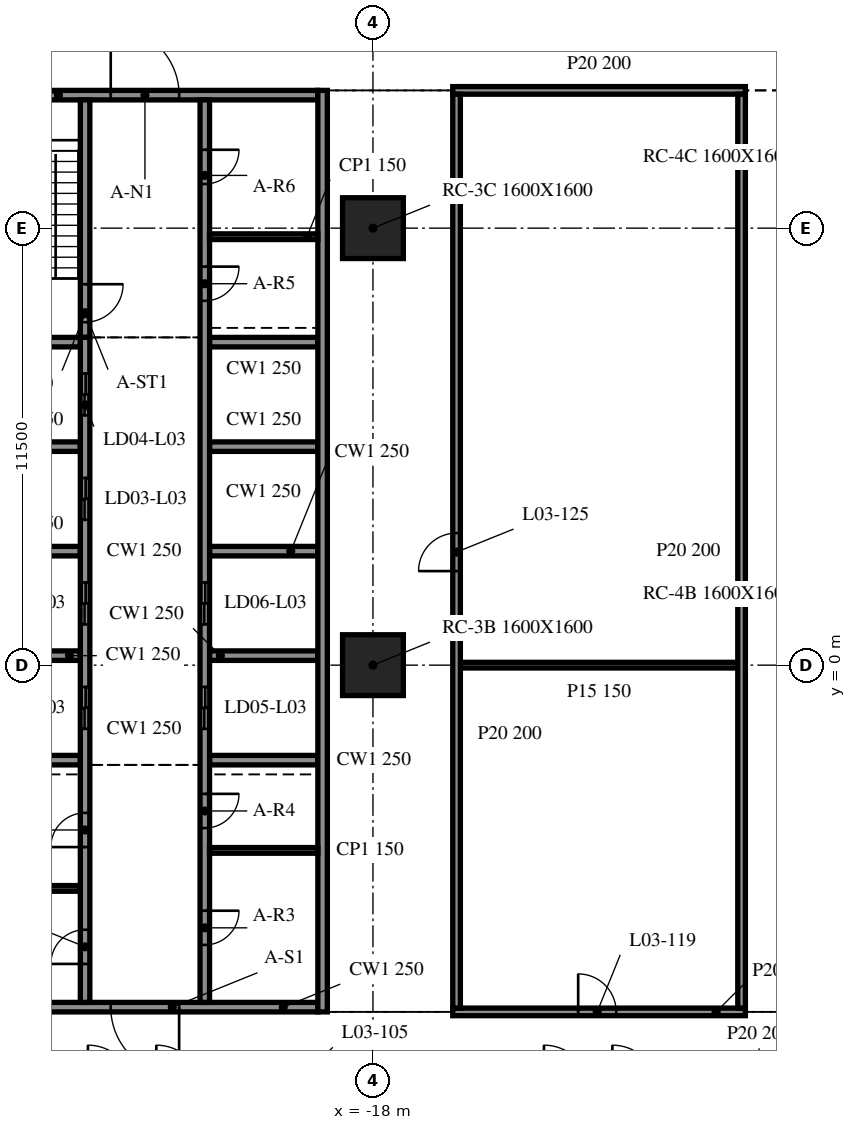
"""IFC4 building model, lengths in metres.
Left out: names, types, materials, properties, quantities, classifications, styles, units other than length and angle.
Written with IfcOpenShell. Run it as: python <this file> out.ifc"""

import sys

from ifc_helpers import new_model, si_unit, direction, frame, frame_2d, origin, origin_2d, place, context, subcontext, project, spatial, rectangle, extrude, element, fill, save


model = new_model("IFC4")
c1 = context("Model", 3, precision=1e-05, world=origin(), true_north=direction((0.0, 1.0)))
c2 = subcontext(c1, "Body", "Model", "MODEL_VIEW")
j1 = project(units=[si_unit("LENGTHUNIT", "METRE"), si_unit("PLANEANGLEUNIT", "RADIAN")], contexts=[c1])
p1 = place(None, origin())
s1 = spatial("IfcSite", under=j1, at=p1, CompositionType="ELEMENT")
p2 = place(p1, origin())
s2 = spatial("IfcBuilding", under=s1, at=p2, CompositionType="ELEMENT")
p3 = place(p2, frame((0.0, 0.0, 15.8)))
s3 = spatial("IfcBuildingStorey", under=s2, at=p3, CompositionType="ELEMENT", Elevation=15.8)
for number, where, z_axis, x_axis in (
    (1, (-18.0, 0.0, -0.34), (0.0, 0.0, 1.0), (1.0, 0.0, 0.0)),
    (2, (-18.0, 11.5, -0.34), (0.0, 0.0, 1.0), (1.0, 0.0, 0.0)),
):
    element("IfcColumn", number, at=place(p3, frame(where, z_axis=z_axis, x_axis=x_axis)), inside=s3, PredefinedType="COLUMN", context=c2, shape_type="SweptSolid", body=[
        extrude(rectangle(XDim=1.6, YDim=1.6, at=origin_2d()), origin(), (0.0, 0.0, 1.0), 4.3),
    ])
p4 = place(p3, frame((-19.325, -9.125, 0.0), z_axis=(0.0, 0.0, 1.0), x_axis=(0.0, 1.0, 0.0)))
e3 = element("IfcWall", 3, at=p4, inside=s3, PredefinedType="SOLIDWALL", context=c2, shape_type="SweptSolid", body=[
    extrude(rectangle(XDim=24.25, YDim=0.25, at=frame_2d((12.125, 0.0))), origin(), (0.0, 0.0, 1.0), 3.96),
])
p5 = place(p3, frame((-19.45, -9.0, 0.0), z_axis=(0.0, 0.0, 1.0), x_axis=(-1.0, 0.0, 0.0)))
e4 = element("IfcWall", 4, at=p5, inside=s3, PredefinedType="SOLIDWALL", context=c2, shape_type="SweptSolid", body=[
    extrude(rectangle(XDim=9.1, YDim=0.25, at=frame_2d((4.55, 0.0))), origin(), (0.0, 0.0, 1.0), 3.96),
])
p6 = place(p5, frame((3.65, 0.0, 0.0)))
e5 = element("IfcOpeningElement", 5, at=p6, cuts=e4, PredefinedType="OPENING", context=c2, shape_type="SweptSolid", body=[
    extrude(rectangle(XDim=1.8, YDim=2.1, at=frame_2d((0.9, 1.05))), frame((0.0, 0.135, 0.0), z_axis=(0.0, -1.0, 0.0), x_axis=(1.0, 0.0, 0.0)), (0.0, 0.0, 1.0), 0.27),
])
p7 = place(p3, frame((-28.55, 15.0, 0.0), z_axis=(0.0, 0.0, 1.0), x_axis=(1.0, 0.0, 0.0)))
e6 = element("IfcWall", 6, at=p7, inside=s3, PredefinedType="SOLIDWALL", context=c2, shape_type="SweptSolid", body=[
    extrude(rectangle(XDim=9.1, YDim=0.25, at=frame_2d((4.55, 0.0))), origin(), (0.0, 0.0, 1.0), 3.96),
])
p8 = place(p7, frame((3.65, 0.0, 0.0)))
e7 = element("IfcOpeningElement", 7, at=p8, cuts=e6, PredefinedType="OPENING", context=c2, shape_type="SweptSolid", body=[
    extrude(rectangle(XDim=1.8, YDim=2.1, at=frame_2d((0.9, 1.05))), frame((0.0, 0.135, 0.0), z_axis=(0.0, -1.0, 0.0), x_axis=(1.0, 0.0, 0.0)), (0.0, 0.0, 1.0), 0.27),
])
p9 = place(p3, frame((-25.575, -8.875, 0.0), z_axis=(0.0, 0.0, 1.0), x_axis=(0.0, 1.0, 0.0)))
e8 = element("IfcWall", 8, at=p9, inside=s3, PredefinedType="SOLIDWALL", context=c2, shape_type="SweptSolid", body=[
    extrude(rectangle(XDim=17.5, YDim=0.25, at=frame_2d((8.75, 0.0))), origin(), (0.0, 0.0, 1.0), 3.96),
])
p10 = place(p9, frame((7.2, 0.0, 0.0)))
e9 = element("IfcOpeningElement", 9, at=p10, cuts=e8, PredefinedType="OPENING", context=c2, shape_type="SweptSolid", body=[
    extrude(rectangle(XDim=1.1, YDim=2.1, at=frame_2d((0.55, 1.05))), frame((0.0, 0.135, 0.0), z_axis=(0.0, -1.0, 0.0), x_axis=(1.0, 0.0, 0.0)), (0.0, 0.0, 1.0), 0.27),
])
p11 = place(p9, frame((9.95, 0.0, 0.0)))
e10 = element("IfcOpeningElement", 10, at=p11, cuts=e8, PredefinedType="OPENING", context=c2, shape_type="SweptSolid", body=[
    extrude(rectangle(XDim=1.1, YDim=2.1, at=frame_2d((0.55, 1.05))), frame((0.0, 0.135, 0.0), z_axis=(0.0, -1.0, 0.0), x_axis=(1.0, 0.0, 0.0)), (0.0, 0.0, 1.0), 0.27),
])
p12 = place(p9, frame((12.7, 0.0, 0.0)))
e11 = element("IfcOpeningElement", 11, at=p12, cuts=e8, PredefinedType="OPENING", context=c2, shape_type="SweptSolid", body=[
    extrude(rectangle(XDim=1.1, YDim=2.1, at=frame_2d((0.55, 1.05))), frame((0.0, 0.135, 0.0), z_axis=(0.0, -1.0, 0.0), x_axis=(1.0, 0.0, 0.0)), (0.0, 0.0, 1.0), 0.27),
])
p13 = place(p9, frame((15.45, 0.0, 0.0)))
e12 = element("IfcOpeningElement", 12, at=p13, cuts=e8, PredefinedType="OPENING", context=c2, shape_type="SweptSolid", body=[
    extrude(rectangle(XDim=1.1, YDim=2.1, at=frame_2d((0.55, 1.05))), frame((0.0, 0.135, 0.0), z_axis=(0.0, -1.0, 0.0), x_axis=(1.0, 0.0, 0.0)), (0.0, 0.0, 1.0), 0.27),
])
p14 = place(p9, frame((1.012, 0.0, 0.0)))
e13 = element("IfcOpeningElement", 13, at=p14, cuts=e8, PredefinedType="OPENING", context=c2, shape_type="SweptSolid", body=[
    extrude(rectangle(XDim=0.9, YDim=2.1, at=frame_2d((0.45, 1.05))), frame((0.0, 0.135, 0.0), z_axis=(0.0, -1.0, 0.0), x_axis=(1.0, 0.0, 0.0)), (0.0, 0.0, 1.0), 0.27),
])
p15 = place(p9, frame((4.087, 0.0, 0.0)))
e14 = element("IfcOpeningElement", 14, at=p15, cuts=e8, PredefinedType="OPENING", context=c2, shape_type="SweptSolid", body=[
    extrude(rectangle(XDim=0.9, YDim=2.1, at=frame_2d((0.45, 1.05))), frame((0.0, 0.135, 0.0), z_axis=(0.0, -1.0, 0.0), x_axis=(1.0, 0.0, 0.0)), (0.0, 0.0, 1.0), 0.27),
])
p16 = place(p3, frame((-25.575, 14.875, 0.0), z_axis=(0.0, 0.0, 1.0), x_axis=(0.0, -1.0, 0.0)))
e15 = element("IfcWall", 15, at=p16, inside=s3, PredefinedType="SOLIDWALL", context=c2, shape_type="SweptSolid", body=[
    extrude(rectangle(XDim=6.25, YDim=0.25, at=frame_2d((3.125, 0.0))), origin(), (0.0, 0.0, 1.0), 3.96),
])
p17 = place(p16, frame((4.85, 0.0, 0.0)))
e16 = element("IfcOpeningElement", 16, at=p17, cuts=e15, PredefinedType="OPENING", context=c2, shape_type="SweptSolid", body=[
    extrude(rectangle(XDim=1.0, YDim=2.1, at=frame_2d((0.5, 1.05))), frame((0.0, 0.135, 0.0), z_axis=(0.0, -1.0, 0.0), x_axis=(1.0, 0.0, 0.0)), (0.0, 0.0, 1.0), 0.27),
])
p18 = place(p3, frame((-22.425, 14.875, 0.0), z_axis=(0.0, 0.0, 1.0), x_axis=(0.0, -1.0, 0.0)))
e17 = element("IfcWall", 17, at=p18, inside=s3, PredefinedType="SOLIDWALL", context=c2, shape_type="SweptSolid", body=[
    extrude(rectangle(XDim=23.75, YDim=0.25, at=frame_2d((11.875, 0.0))), origin(), (0.0, 0.0, 1.0), 3.96),
])
p19 = place(p18, frame((15.45, 0.0, 0.0)))
e18 = element("IfcOpeningElement", 18, at=p19, cuts=e17, PredefinedType="OPENING", context=c2, shape_type="SweptSolid", body=[
    extrude(rectangle(XDim=1.1, YDim=2.1, at=frame_2d((0.55, 1.05))), frame((0.0, 0.135, 0.0), z_axis=(0.0, -1.0, 0.0), x_axis=(1.0, 0.0, 0.0)), (0.0, 0.0, 1.0), 0.27),
])
p20 = place(p18, frame((12.7, 0.0, 0.0)))
e19 = element("IfcOpeningElement", 19, at=p20, cuts=e17, PredefinedType="OPENING", context=c2, shape_type="SweptSolid", body=[
    extrude(rectangle(XDim=1.1, YDim=2.1, at=frame_2d((0.55, 1.05))), frame((0.0, 0.135, 0.0), z_axis=(0.0, -1.0, 0.0), x_axis=(1.0, 0.0, 0.0)), (0.0, 0.0, 1.0), 0.27),
])
p21 = place(p18, frame((21.337, 0.0, 0.0)))
e20 = element("IfcOpeningElement", 20, at=p21, cuts=e17, PredefinedType="OPENING", context=c2, shape_type="SweptSolid", body=[
    extrude(rectangle(XDim=0.9, YDim=2.1, at=frame_2d((0.45, 1.05))), frame((0.0, 0.135, 0.0), z_axis=(0.0, -1.0, 0.0), x_axis=(1.0, 0.0, 0.0)), (0.0, 0.0, 1.0), 0.27),
])
p22 = place(p18, frame((18.262, 0.0, 0.0)))
e21 = element("IfcOpeningElement", 21, at=p22, cuts=e17, PredefinedType="OPENING", context=c2, shape_type="SweptSolid", body=[
    extrude(rectangle(XDim=0.9, YDim=2.1, at=frame_2d((0.45, 1.05))), frame((0.0, 0.135, 0.0), z_axis=(0.0, -1.0, 0.0), x_axis=(1.0, 0.0, 0.0)), (0.0, 0.0, 1.0), 0.27),
])
p23 = place(p18, frame((4.387, 0.0, 0.0)))
e22 = element("IfcOpeningElement", 22, at=p23, cuts=e17, PredefinedType="OPENING", context=c2, shape_type="SweptSolid", body=[
    extrude(rectangle(XDim=0.9, YDim=2.1, at=frame_2d((0.45, 1.05))), frame((0.0, 0.135, 0.0), z_axis=(0.0, -1.0, 0.0), x_axis=(1.0, 0.0, 0.0)), (0.0, 0.0, 1.0), 0.27),
])
p24 = place(p18, frame((1.312, 0.0, 0.0)))
e23 = element("IfcOpeningElement", 23, at=p24, cuts=e17, PredefinedType="OPENING", context=c2, shape_type="SweptSolid", body=[
    extrude(rectangle(XDim=0.9, YDim=2.1, at=frame_2d((0.45, 1.05))), frame((0.0, 0.135, 0.0), z_axis=(0.0, -1.0, 0.0), x_axis=(1.0, 0.0, 0.0)), (0.0, 0.0, 1.0), 0.27),
])
for number, where, z_axis, x_axis in (
    (24, (-28.55, -2.5, 0.0), (0.0, 0.0, 1.0), (1.0, 0.0, 0.0)),
    (25, (-28.55, 0.25, 0.0), (0.0, 0.0, 1.0), (1.0, 0.0, 0.0)),
    (26, (-28.55, 3.0, 0.0), (0.0, 0.0, 1.0), (1.0, 0.0, 0.0)),
    (27, (-28.55, 5.75, 0.0), (0.0, 0.0, 1.0), (1.0, 0.0, 0.0)),
    (28, (-28.55, 8.5, 0.0), (0.0, 0.0, 1.0), (1.0, 0.0, 0.0)),
    (29, (-22.3, -2.5, 0.0), (0.0, 0.0, 1.0), (1.0, 0.0, 0.0)),
    (30, (-22.3, 0.25, 0.0), (0.0, 0.0, 1.0), (1.0, 0.0, 0.0)),
    (31, (-22.3, 3.0, 0.0), (0.0, 0.0, 1.0), (1.0, 0.0, 0.0)),
    (32, (-22.3, 5.75, 0.0), (0.0, 0.0, 1.0), (1.0, 0.0, 0.0)),
    (33, (-22.3, 8.5, 0.0), (0.0, 0.0, 1.0), (1.0, 0.0, 0.0)),
):
    element("IfcWall", number, at=place(p3, frame(where, z_axis=z_axis, x_axis=x_axis)), inside=s3, PredefinedType="SOLIDWALL", context=c2, shape_type="SweptSolid", body=[
        extrude(rectangle(XDim=2.85, YDim=0.25, at=frame_2d((1.425, 0.0))), origin(), (0.0, 0.0, 1.0), 3.96),
    ])
for number, where, z_axis, x_axis in (
    (34, (-28.55, -5.875, 0.0), (0.0, 0.0, 1.0), (1.0, 0.0, 0.0)),
    (35, (-22.3, -4.875, 0.0), (0.0, 0.0, 1.0), (1.0, 0.0, 0.0)),
    (36, (-22.3, 11.275, 0.0), (0.0, 0.0, 1.0), (1.0, 0.0, 0.0)),
):
    element("IfcWall", number, at=place(p3, frame(where, z_axis=z_axis, x_axis=x_axis)), inside=s3, PredefinedType="PARTITIONING", context=c2, shape_type="SweptSolid", body=[
        extrude(rectangle(XDim=2.85, YDim=0.15, at=frame_2d((1.425, 0.0))), origin(), (0.0, 0.0, 1.0), 3.96),
    ])
p25 = place(p3, frame((-15.9, -9.125, 0.0), z_axis=(0.0, 0.0, 1.0), x_axis=(1.0, 0.0, 0.0)))
e37 = element("IfcWall", 37, at=p25, inside=s3, PredefinedType="PARTITIONING", context=c2, shape_type="SweptSolid", body=[
    extrude(rectangle(XDim=7.7, YDim=0.2, at=frame_2d((3.85, 0.0))), origin(), (0.0, 0.0, 1.0), 3.96),
])
p26 = place(p25, frame((3.3, 0.0, 0.0)))
e38 = element("IfcOpeningElement", 38, at=p26, cuts=e37, PredefinedType="OPENING", context=c2, shape_type="SweptSolid", body=[
    extrude(rectangle(XDim=1.0, YDim=2.1, at=frame_2d((0.5, 1.05))), frame((0.0, 0.11, 0.0), z_axis=(0.0, -1.0, 0.0), x_axis=(1.0, 0.0, 0.0)), (0.0, 0.0, 1.0), 0.22),
])
p27 = place(p3, frame((-15.7, 0.0, 0.0), z_axis=(0.0, 0.0, 1.0), x_axis=(1.0, 0.0, 0.0)))
e39 = element("IfcWall", 39, at=p27, inside=s3, PredefinedType="PARTITIONING", context=c2, shape_type="SweptSolid", body=[
    extrude(rectangle(XDim=7.3, YDim=0.15, at=frame_2d((3.65, 0.0))), origin(), (0.0, 0.0, 1.0), 3.96),
])
p28 = place(p3, frame((-15.9, 15.125, 0.0), z_axis=(0.0, 0.0, 1.0), x_axis=(1.0, 0.0, 0.0)))
e40 = element("IfcWall", 40, at=p28, inside=s3, PredefinedType="PARTITIONING", context=c2, shape_type="SweptSolid", body=[
    extrude(rectangle(XDim=7.7, YDim=0.2, at=frame_2d((3.85, 0.0))), origin(), (0.0, 0.0, 1.0), 3.96),
])
p29 = place(p3, frame((-15.8, -9.025, 0.0), z_axis=(0.0, 0.0, 1.0), x_axis=(0.0, 1.0, 0.0)))
e41 = element("IfcWall", 41, at=p29, inside=s3, PredefinedType="PARTITIONING", context=c2, shape_type="SweptSolid", body=[
    extrude(rectangle(XDim=24.05, YDim=0.2, at=frame_2d((12.025, 0.0))), origin(), (0.0, 0.0, 1.0), 3.96),
])
p30 = place(p29, frame((11.5, 0.0, 0.0)))
e42 = element("IfcOpeningElement", 42, at=p30, cuts=e41, PredefinedType="OPENING", context=c2, shape_type="SweptSolid", body=[
    extrude(rectangle(XDim=1.0, YDim=2.1, at=frame_2d((0.5, 1.05))), frame((0.0, 0.11, 0.0), z_axis=(0.0, -1.0, 0.0), x_axis=(1.0, 0.0, 0.0)), (0.0, 0.0, 1.0), 0.22),
])
p31 = place(p3, frame((-8.3, -9.025, 0.0), z_axis=(0.0, 0.0, 1.0), x_axis=(0.0, 1.0, 0.0)))
e43 = element("IfcWall", 43, at=p31, inside=s3, PredefinedType="PARTITIONING", context=c2, shape_type="SweptSolid", body=[
    extrude(rectangle(XDim=24.05, YDim=0.2, at=frame_2d((12.025, 0.0))), origin(), (0.0, 0.0, 1.0), 3.96),
])
p32 = place(p6, origin())
e44 = element("IfcDoor", 44, at=p32, inside=s3, OperationType="DOUBLE_DOOR_SINGLE_SWING", PredefinedType="DOOR", context=c2, shape_type="SweptSolid", body=[
    extrude(rectangle(XDim=1.8, YDim=2.1, at=frame_2d((0.9, 1.05))), frame((0.0, 0.025, 0.0), z_axis=(0.0, -1.0, 0.0), x_axis=(1.0, 0.0, 0.0)), (0.0, 0.0, 1.0), 0.05),
])
fill(e5, e44)
p33 = place(p8, origin())
e45 = element("IfcDoor", 45, at=p33, inside=s3, OperationType="DOUBLE_DOOR_SINGLE_SWING", PredefinedType="DOOR", context=c2, shape_type="SweptSolid", body=[
    extrude(rectangle(XDim=1.8, YDim=2.1, at=frame_2d((0.9, 1.05))), frame((0.0, 0.025, 0.0), z_axis=(0.0, -1.0, 0.0), x_axis=(1.0, 0.0, 0.0)), (0.0, 0.0, 1.0), 0.05),
])
fill(e7, e45)
p34 = place(p19, origin())
e46 = element("IfcDoor", 46, at=p34, inside=s3, OperationType="DOUBLE_DOOR_SLIDING", PredefinedType="DOOR", context=c2, shape_type="SweptSolid", body=[
    extrude(rectangle(XDim=1.1, YDim=2.1, at=frame_2d((0.55, 1.05))), frame((0.0, 0.025, 0.0), z_axis=(0.0, -1.0, 0.0), x_axis=(1.0, 0.0, 0.0)), (0.0, 0.0, 1.0), 0.05),
])
fill(e18, e46)
p35 = place(p20, origin())
e47 = element("IfcDoor", 47, at=p35, inside=s3, OperationType="DOUBLE_DOOR_SLIDING", PredefinedType="DOOR", context=c2, shape_type="SweptSolid", body=[
    extrude(rectangle(XDim=1.1, YDim=2.1, at=frame_2d((0.55, 1.05))), frame((0.0, 0.025, 0.0), z_axis=(0.0, -1.0, 0.0), x_axis=(1.0, 0.0, 0.0)), (0.0, 0.0, 1.0), 0.05),
])
fill(e19, e47)
p36 = place(p10, origin())
e48 = element("IfcDoor", 48, at=p36, inside=s3, OperationType="DOUBLE_DOOR_SLIDING", PredefinedType="DOOR", context=c2, shape_type="SweptSolid", body=[
    extrude(rectangle(XDim=1.1, YDim=2.1, at=frame_2d((0.55, 1.05))), frame((0.0, 0.025, 0.0), z_axis=(0.0, -1.0, 0.0), x_axis=(1.0, 0.0, 0.0)), (0.0, 0.0, 1.0), 0.05),
])
fill(e9, e48)
p37 = place(p11, origin())
e49 = element("IfcDoor", 49, at=p37, inside=s3, OperationType="DOUBLE_DOOR_SLIDING", PredefinedType="DOOR", context=c2, shape_type="SweptSolid", body=[
    extrude(rectangle(XDim=1.1, YDim=2.1, at=frame_2d((0.55, 1.05))), frame((0.0, 0.025, 0.0), z_axis=(0.0, -1.0, 0.0), x_axis=(1.0, 0.0, 0.0)), (0.0, 0.0, 1.0), 0.05),
])
fill(e10, e49)
p38 = place(p12, origin())
e50 = element("IfcDoor", 50, at=p38, inside=s3, OperationType="DOUBLE_DOOR_SLIDING", PredefinedType="DOOR", context=c2, shape_type="SweptSolid", body=[
    extrude(rectangle(XDim=1.1, YDim=2.1, at=frame_2d((0.55, 1.05))), frame((0.0, 0.025, 0.0), z_axis=(0.0, -1.0, 0.0), x_axis=(1.0, 0.0, 0.0)), (0.0, 0.0, 1.0), 0.05),
])
fill(e11, e50)
p39 = place(p13, origin())
e51 = element("IfcDoor", 51, at=p39, inside=s3, OperationType="DOUBLE_DOOR_SLIDING", PredefinedType="DOOR", context=c2, shape_type="SweptSolid", body=[
    extrude(rectangle(XDim=1.1, YDim=2.1, at=frame_2d((0.55, 1.05))), frame((0.0, 0.025, 0.0), z_axis=(0.0, -1.0, 0.0), x_axis=(1.0, 0.0, 0.0)), (0.0, 0.0, 1.0), 0.05),
])
fill(e12, e51)
p40 = place(p14, origin())
e52 = element("IfcDoor", 52, at=p40, inside=s3, OperationType="SINGLE_SWING_LEFT", PredefinedType="DOOR", context=c2, shape_type="SweptSolid", body=[
    extrude(rectangle(XDim=0.9, YDim=2.1, at=frame_2d((0.45, 1.05))), frame((0.0, 0.025, 0.0), z_axis=(0.0, -1.0, 0.0), x_axis=(1.0, 0.0, 0.0)), (0.0, 0.0, 1.0), 0.05),
])
fill(e13, e52)
p41 = place(p15, origin())
e53 = element("IfcDoor", 53, at=p41, inside=s3, OperationType="SINGLE_SWING_RIGHT", PredefinedType="DOOR", context=c2, shape_type="SweptSolid", body=[
    extrude(rectangle(XDim=0.9, YDim=2.1, at=frame_2d((0.45, 1.05))), frame((0.0, 0.025, 0.0), z_axis=(0.0, -1.0, 0.0), x_axis=(1.0, 0.0, 0.0)), (0.0, 0.0, 1.0), 0.05),
])
fill(e14, e53)
p42 = place(p21, origin())
e54 = element("IfcDoor", 54, at=p42, inside=s3, OperationType="SINGLE_SWING_LEFT", PredefinedType="DOOR", context=c2, shape_type="SweptSolid", body=[
    extrude(rectangle(XDim=0.9, YDim=2.1, at=frame_2d((0.45, 1.05))), frame((0.0, 0.025, 0.0), z_axis=(0.0, -1.0, 0.0), x_axis=(1.0, 0.0, 0.0)), (0.0, 0.0, 1.0), 0.05),
])
fill(e20, e54)
p43 = place(p22, origin())
e55 = element("IfcDoor", 55, at=p43, inside=s3, OperationType="SINGLE_SWING_RIGHT", PredefinedType="DOOR", context=c2, shape_type="SweptSolid", body=[
    extrude(rectangle(XDim=0.9, YDim=2.1, at=frame_2d((0.45, 1.05))), frame((0.0, 0.025, 0.0), z_axis=(0.0, -1.0, 0.0), x_axis=(1.0, 0.0, 0.0)), (0.0, 0.0, 1.0), 0.05),
])
fill(e21, e55)
p44 = place(p23, origin())
e56 = element("IfcDoor", 56, at=p44, inside=s3, OperationType="SINGLE_SWING_LEFT", PredefinedType="DOOR", context=c2, shape_type="SweptSolid", body=[
    extrude(rectangle(XDim=0.9, YDim=2.1, at=frame_2d((0.45, 1.05))), frame((0.0, 0.025, 0.0), z_axis=(0.0, -1.0, 0.0), x_axis=(1.0, 0.0, 0.0)), (0.0, 0.0, 1.0), 0.05),
])
fill(e22, e56)
p45 = place(p24, origin())
e57 = element("IfcDoor", 57, at=p45, inside=s3, OperationType="SINGLE_SWING_RIGHT", PredefinedType="DOOR", context=c2, shape_type="SweptSolid", body=[
    extrude(rectangle(XDim=0.9, YDim=2.1, at=frame_2d((0.45, 1.05))), frame((0.0, 0.025, 0.0), z_axis=(0.0, -1.0, 0.0), x_axis=(1.0, 0.0, 0.0)), (0.0, 0.0, 1.0), 0.05),
])
fill(e23, e57)
p46 = place(p17, origin())
e58 = element("IfcDoor", 58, at=p46, inside=s3, OperationType="SINGLE_SWING_LEFT", PredefinedType="DOOR", context=c2, shape_type="SweptSolid", body=[
    extrude(rectangle(XDim=1.0, YDim=2.1, at=frame_2d((0.5, 1.05))), frame((0.0, 0.025, 0.0), z_axis=(0.0, -1.0, 0.0), x_axis=(1.0, 0.0, 0.0)), (0.0, 0.0, 1.0), 0.05),
])
fill(e16, e58)
p47 = place(p26, origin())
e59 = element("IfcDoor", 59, at=p47, inside=s3, OperationType="SINGLE_SWING_LEFT", PredefinedType="DOOR", context=c2, shape_type="SweptSolid", body=[
    extrude(rectangle(XDim=1.0, YDim=2.1, at=frame_2d((0.5, 1.05))), frame((0.0, 0.025, 0.0), z_axis=(0.0, -1.0, 0.0), x_axis=(1.0, 0.0, 0.0)), (0.0, 0.0, 1.0), 0.05),
])
fill(e38, e59)
p48 = place(p30, origin())
e60 = element("IfcDoor", 60, at=p48, inside=s3, OperationType="SINGLE_SWING_RIGHT", PredefinedType="DOOR", context=c2, shape_type="SweptSolid", body=[
    extrude(rectangle(XDim=1.0, YDim=2.1, at=frame_2d((0.5, 1.05))), frame((0.0, 0.025, 0.0), z_axis=(0.0, -1.0, 0.0), x_axis=(1.0, 0.0, 0.0)), (0.0, 0.0, 1.0), 0.05),
])
fill(e42, e60)
save(model, sys.argv[1])
